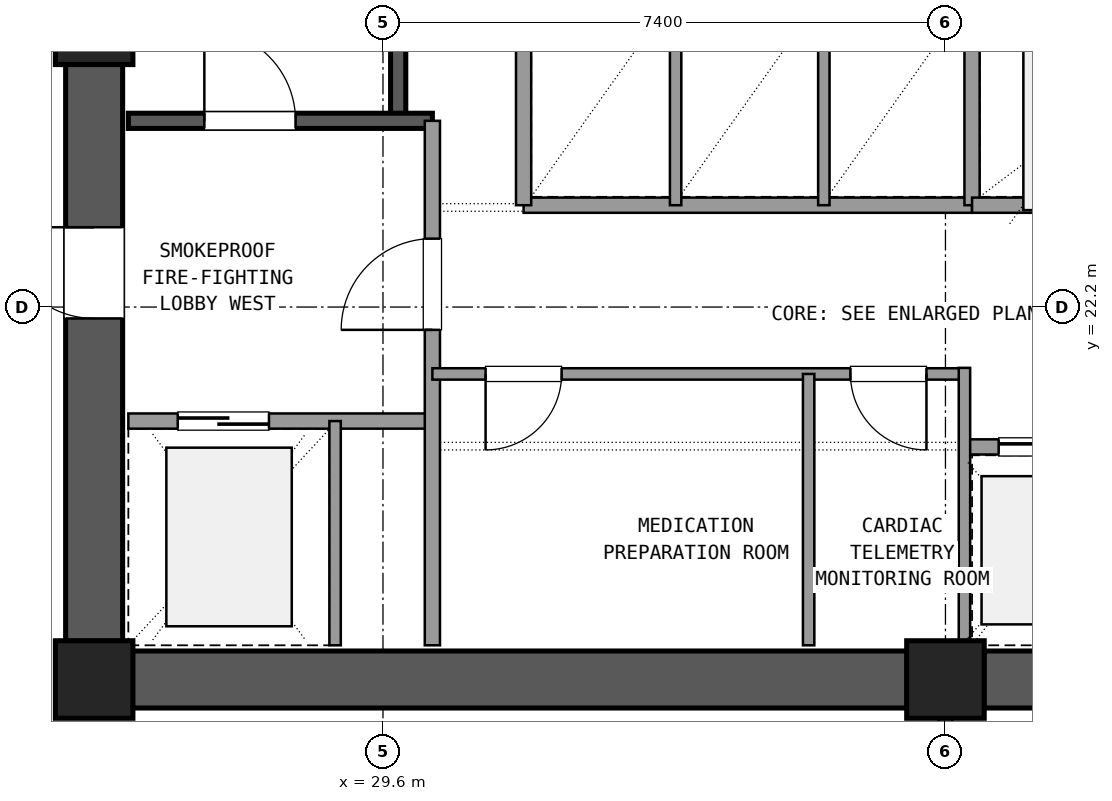
"""IFC4 building model, lengths in metres.
Left out: names, types, materials, properties, quantities, classifications, styles, units other than length and angle.
Written with IfcOpenShell. Run it as: python <this file> out.ifc"""

import sys

from ifc_helpers import new_model, si_unit, direction, frame, frame_2d, origin, origin_2d, place, context, subcontext, project, spatial, rectangle, extrude, element, fill, save


model = new_model("IFC4")
c1 = context("Model", 3, precision=1e-05, world=origin(), true_north=direction((0.0, 1.0)))
c2 = subcontext(c1, "Body", "Model", "MODEL_VIEW")
j1 = project(units=[si_unit("LENGTHUNIT", "METRE"), si_unit("PLANEANGLEUNIT", "RADIAN")], contexts=[c1])
p1 = place(None, origin())
s1 = spatial("IfcSite", under=j1, at=p1, CompositionType="ELEMENT")
p2 = place(p1, origin())
s2 = spatial("IfcBuilding", under=s1, at=p2, CompositionType="ELEMENT")
p3 = place(p2, frame((0.0, 0.0, 160.02)))
s3 = spatial("IfcBuildingStorey", under=s2, at=p3, CompositionType="ELEMENT", Elevation=160.02)
for number, where, z_axis, x_axis in (
    (1, (25.8, 17.3, 0.0), (0.0, 0.0, 1.0), (1.0, 0.0, 0.0)),
    (2, (37.0, 17.3, 0.0), (0.0, 0.0, 1.0), (1.0, 0.0, 0.0)),
    (3, (25.8, 25.9, 0.0), (0.0, 0.0, 1.0), (1.0, 0.0, 0.0)),
):
    element("IfcColumn", number, at=place(p3, frame(where, z_axis=z_axis, x_axis=x_axis)), inside=s3, PredefinedType="COLUMN", context=c2, shape_type="SweptSolid", body=[
        extrude(rectangle(XDim=1.02, YDim=1.02, at=origin_2d()), origin(), (0.0, 0.0, 1.0), 3.6),
    ])
for number, where, z_axis, x_axis in (
    (4, (26.305, 17.3, 0.0), (0.0, 0.0, 1.0), (1.0, 0.0, 0.0)),
    (5, (37.505, 17.3, 0.0), (0.0, 0.0, 1.0), (1.0, 0.0, 0.0)),
):
    element("IfcWall", number, at=place(p3, frame(where, z_axis=z_axis, x_axis=x_axis)), inside=s3, PredefinedType="SHEAR", context=c2, shape_type="SweptSolid", body=[
        extrude(rectangle(XDim=10.19, YDim=0.75, at=frame_2d((5.095, 0.0))), origin(), (0.0, 0.0, 1.0), 3.32),
    ])
p4 = place(p3, frame((25.8, 25.395, 0.0), z_axis=(0.0, 0.0, 1.0), x_axis=(0.0, -1.0, 0.0)))
e6 = element("IfcWall", 6, at=p4, inside=s3, PredefinedType="SHEAR", context=c2, shape_type="SweptSolid", body=[
    extrude(rectangle(XDim=7.59, YDim=0.75, at=frame_2d((3.795, 0.0))), origin(), (0.0, 0.0, 1.0), 3.32),
])
p5 = place(p4, frame((2.145, 0.0, 0.0)))
e7 = element("IfcOpeningElement", 7, at=p5, cuts=e6, PredefinedType="OPENING", context=c2, shape_type="SweptSolid", body=[
    extrude(rectangle(XDim=1.2, YDim=2.15, at=frame_2d((0.6, 1.075))), frame((0.0, 0.385, 0.0), z_axis=(0.0, -1.0, 0.0), x_axis=(1.0, 0.0, 0.0)), (0.0, 0.0, 1.0), 0.77),
])
p6 = place(p3, frame((29.8, 24.65, 0.0), z_axis=(0.0, 0.0, 1.0), x_axis=(0.0, 1.0, 0.0)))
e8 = element("IfcWall", 8, at=p6, inside=s3, PredefinedType="SHEAR", context=c2, shape_type="SweptSolid", body=[
    extrude(rectangle(XDim=9.4, YDim=0.2, at=frame_2d((4.7, 0.0))), origin(), (0.0, 0.0, 1.0), 3.32),
])
p7 = place(p3, frame((26.25, 24.65, 0.0), z_axis=(0.0, 0.0, 1.0), x_axis=(1.0, 0.0, 0.0)))
e9 = element("IfcWall", 9, at=p7, inside=s3, PredefinedType="SHEAR", context=c2, shape_type="SweptSolid", body=[
    extrude(rectangle(XDim=4.0, YDim=0.2, at=frame_2d((2.0, 0.0))), origin(), (0.0, 0.0, 1.0), 3.32),
])
p8 = place(p7, frame((1.0, 0.0, 0.0)))
e10 = element("IfcOpeningElement", 10, at=p8, cuts=e9, PredefinedType="OPENING", context=c2, shape_type="SweptSolid", body=[
    extrude(rectangle(XDim=1.2, YDim=2.15, at=frame_2d((0.6, 1.075))), frame((0.0, 0.11, 0.0), z_axis=(0.0, -1.0, 0.0), x_axis=(1.0, 0.0, 0.0)), (0.0, 0.0, 1.0), 0.22),
])
p9 = place(p3, frame((26.25, 20.7, 0.0), z_axis=(0.0, 0.0, 1.0), x_axis=(1.0, 0.0, 0.0)))
e11 = element("IfcWall", 11, at=p9, inside=s3, PredefinedType="SOLIDWALL", context=c2, shape_type="SweptSolid", body=[
    extrude(rectangle(XDim=4.0, YDim=0.2, at=frame_2d((2.0, 0.0))), origin(), (0.0, 0.0, 1.0), 2.61),
])
p10 = place(p9, frame((0.65, 0.0, 0.0)))
e12 = element("IfcOpeningElement", 12, at=p10, cuts=e11, PredefinedType="OPENING", context=c2, shape_type="SweptSolid", body=[
    extrude(rectangle(XDim=1.2, YDim=2.15, at=frame_2d((0.6, 1.075))), frame((0.0, 0.11, 0.0), z_axis=(0.0, -1.0, 0.0), x_axis=(1.0, 0.0, 0.0)), (0.0, 0.0, 1.0), 0.22),
])
p11 = place(p3, frame((30.25, 17.75, 0.0), z_axis=(0.0, 0.0, 1.0), x_axis=(0.0, 1.0, 0.0)))
e13 = element("IfcWall", 13, at=p11, inside=s3, PredefinedType="SOLIDWALL", context=c2, shape_type="SweptSolid", body=[
    extrude(rectangle(XDim=6.9, YDim=0.2, at=frame_2d((3.45, 0.0))), origin(), (0.0, 0.0, 1.0), 2.61),
])
p12 = place(p11, frame((4.15, 0.0, 0.0)))
e14 = element("IfcOpeningElement", 14, at=p12, cuts=e13, PredefinedType="OPENING", context=c2, shape_type="SweptSolid", body=[
    extrude(rectangle(XDim=1.2, YDim=2.15, at=frame_2d((0.6, 1.075))), frame((0.0, 0.11, 0.0), z_axis=(0.0, -1.0, 0.0), x_axis=(1.0, 0.0, 0.0)), (0.0, 0.0, 1.0), 0.22),
])
p13 = place(p3, frame((28.97, 17.75, 0.0), z_axis=(0.0, 0.0, 1.0), x_axis=(0.0, 1.0, 0.0)))
e15 = element("IfcWall", 15, at=p13, inside=s3, PredefinedType="PARTITIONING", context=c2, shape_type="SweptSolid", body=[
    extrude(rectangle(XDim=2.95, YDim=0.15, at=frame_2d((1.475, 0.0))), origin(), (0.0, 0.0, 1.0), 2.61),
])
p14 = place(p3, frame((30.25, 21.32, 0.0), z_axis=(0.0, 0.0, 1.0), x_axis=(1.0, 0.0, 0.0)))
e16 = element("IfcWall", 16, at=p14, inside=s3, PredefinedType="PARTITIONING", context=c2, shape_type="SweptSolid", body=[
    extrude(rectangle(XDim=7.0, YDim=0.15, at=frame_2d((3.5, 0.0))), origin(), (0.0, 0.0, 1.0), 2.61),
])
p15 = place(p14, frame((0.7, 0.0, 0.0)))
e17 = element("IfcOpeningElement", 17, at=p15, cuts=e16, PredefinedType="OPENING", context=c2, shape_type="SweptSolid", body=[
    extrude(rectangle(XDim=1.0, YDim=2.15, at=frame_2d((0.5, 1.075))), frame((0.0, 0.085, 0.0), z_axis=(0.0, -1.0, 0.0), x_axis=(1.0, 0.0, 0.0)), (0.0, 0.0, 1.0), 0.17),
])
p16 = place(p14, frame((5.5, 0.0, 0.0)))
e18 = element("IfcOpeningElement", 18, at=p16, cuts=e16, PredefinedType="OPENING", context=c2, shape_type="SweptSolid", body=[
    extrude(rectangle(XDim=1.0, YDim=2.15, at=frame_2d((0.5, 1.075))), frame((0.0, 0.085, 0.0), z_axis=(0.0, -1.0, 0.0), x_axis=(1.0, 0.0, 0.0)), (0.0, 0.0, 1.0), 0.17),
])
p17 = place(p3, frame((35.2, 17.75, 0.0), z_axis=(0.0, 0.0, 1.0), x_axis=(0.0, 1.0, 0.0)))
e19 = element("IfcWall", 19, at=p17, inside=s3, PredefinedType="PARTITIONING", context=c2, shape_type="SweptSolid", body=[
    extrude(rectangle(XDim=3.57, YDim=0.15, at=frame_2d((1.785, 0.0))), origin(), (0.0, 0.0, 1.0), 2.61),
])
p18 = place(p3, frame((37.25, 20.36, 0.0), z_axis=(0.0, 0.0, 1.0), x_axis=(1.0, 0.0, 0.0)))
e20 = element("IfcWall", 20, at=p18, inside=s3, PredefinedType="SOLIDWALL", context=c2, shape_type="SweptSolid", body=[
    extrude(rectangle(XDim=6.1, YDim=0.2, at=frame_2d((3.05, 0.0))), origin(), (0.0, 0.0, 1.0), 2.61),
])
p19 = place(p18, frame((0.45, 0.0, 0.0)))
e21 = element("IfcOpeningElement", 21, at=p19, cuts=e20, PredefinedType="OPENING", context=c2, shape_type="SweptSolid", body=[
    extrude(rectangle(XDim=1.1, YDim=2.15, at=frame_2d((0.55, 1.075))), frame((0.0, 0.11, 0.0), z_axis=(0.0, -1.0, 0.0), x_axis=(1.0, 0.0, 0.0)), (0.0, 0.0, 1.0), 0.22),
])
p20 = place(p18, frame((2.5, 0.0, 0.0)))
e22 = element("IfcOpeningElement", 22, at=p20, cuts=e20, PredefinedType="OPENING", context=c2, shape_type="SweptSolid", body=[
    extrude(rectangle(XDim=1.1, YDim=2.15, at=frame_2d((0.55, 1.075))), frame((0.0, 0.11, 0.0), z_axis=(0.0, -1.0, 0.0), x_axis=(1.0, 0.0, 0.0)), (0.0, 0.0, 1.0), 0.22),
])
p21 = place(p18, frame((4.55, 0.0, 0.0)))
e23 = element("IfcOpeningElement", 23, at=p21, cuts=e20, PredefinedType="OPENING", context=c2, shape_type="SweptSolid", body=[
    extrude(rectangle(XDim=1.1, YDim=2.15, at=frame_2d((0.55, 1.075))), frame((0.0, 0.11, 0.0), z_axis=(0.0, -1.0, 0.0), x_axis=(1.0, 0.0, 0.0)), (0.0, 0.0, 1.0), 0.22),
])
p22 = place(p3, frame((37.25, 17.75, 0.0), z_axis=(0.0, 0.0, 1.0), x_axis=(0.0, 1.0, 0.0)))
e24 = element("IfcWall", 24, at=p22, inside=s3, PredefinedType="PARTITIONING", context=c2, shape_type="SweptSolid", body=[
    extrude(rectangle(XDim=3.65, YDim=0.15, at=frame_2d((1.825, 0.0))), origin(), (0.0, 0.0, 1.0), 2.61),
])
p23 = place(p3, frame((31.45, 23.54, 0.0), z_axis=(0.0, 0.0, 1.0), x_axis=(1.0, 0.0, 0.0)))
e25 = element("IfcWall", 25, at=p23, inside=s3, PredefinedType="SOLIDWALL", context=c2, shape_type="SweptSolid", body=[
    extrude(rectangle(XDim=5.9, YDim=0.2, at=frame_2d((2.95, 0.0))), origin(), (0.0, 0.0, 1.0), 2.61),
])
p24 = place(p3, frame((31.45, 23.54, 0.0), z_axis=(0.0, 0.0, 1.0), x_axis=(0.0, 1.0, 0.0)))
e26 = element("IfcWall", 26, at=p24, inside=s3, PredefinedType="SOLIDWALL", context=c2, shape_type="SweptSolid", body=[
    extrude(rectangle(XDim=2.81, YDim=0.2, at=frame_2d((1.405, 0.0))), origin(), (0.0, 0.0, 1.0), 2.61),
])
for number, where, z_axis, x_axis in (
    (27, (33.45, 23.54, 0.0), (0.0, 0.0, 1.0), (0.0, 1.0, 0.0)),
    (28, (35.4, 23.54, 0.0), (0.0, 0.0, 1.0), (0.0, 1.0, 0.0)),
):
    element("IfcWall", number, at=place(p3, frame(where, z_axis=z_axis, x_axis=x_axis)), inside=s3, PredefinedType="PARTITIONING", context=c2, shape_type="SweptSolid", body=[
        extrude(rectangle(XDim=2.81, YDim=0.15, at=frame_2d((1.405, 0.0))), origin(), (0.0, 0.0, 1.0), 2.61),
    ])
p25 = place(p3, frame((37.35, 23.54, 0.0), z_axis=(0.0, 0.0, 1.0), x_axis=(0.0, 1.0, 0.0)))
e29 = element("IfcWall", 29, at=p25, inside=s3, PredefinedType="SOLIDWALL", context=c2, shape_type="SweptSolid", body=[
    extrude(rectangle(XDim=6.82, YDim=0.2, at=frame_2d((3.41, 0.0))), origin(), (0.0, 0.0, 1.0), 2.61),
])
p26 = place(p3, frame((37.35, 23.54, 0.0), z_axis=(0.0, 0.0, 1.0), x_axis=(1.0, 0.0, 0.0)))
e30 = element("IfcWall", 30, at=p26, inside=s3, PredefinedType="SOLIDWALL", context=c2, shape_type="SweptSolid", body=[
    extrude(rectangle(XDim=3.05, YDim=0.2, at=frame_2d((1.525, 0.0))), origin(), (0.0, 0.0, 1.0), 2.61),
])
p27 = place(p3, frame((37.0, 13.64, 0.0), z_axis=(0.0, 0.0, 1.0), x_axis=(0.0, 1.0, 0.0)))
e31 = element("IfcWall", 31, at=p27, inside=s3, PredefinedType="PARTITIONING", context=c2, shape_type="SweptSolid", body=[
    extrude(rectangle(XDim=3.21, YDim=0.18, at=frame_2d((1.605, 0.0))), origin(), (0.0, 0.0, 1.0), 2.61),
])
p28 = place(p27, frame((0.605, 0.0, 0.0)))
e32 = element("IfcOpeningElement", 32, at=p28, cuts=e31, PredefinedType="OPENING", context=c2, shape_type="SweptSolid", body=[
    extrude(rectangle(XDim=2.0, YDim=2.2, at=frame_2d((1.0, 1.1))), frame((0.0, 0.1, 0.0), z_axis=(0.0, -1.0, 0.0), x_axis=(1.0, 0.0, 0.0)), (0.0, 0.0, 1.0), 0.2),
])
p29 = place(p8, origin())
e33 = element("IfcDoor", 33, at=p29, inside=s3, OperationType="SINGLE_SWING_LEFT", PredefinedType="DOOR", context=c2, shape_type="SweptSolid", body=[
    extrude(rectangle(XDim=1.2, YDim=2.15, at=frame_2d((0.6, 1.075))), frame((0.0, 0.025, 0.0), z_axis=(0.0, -1.0, 0.0), x_axis=(1.0, 0.0, 0.0)), (0.0, 0.0, 1.0), 0.05),
])
fill(e10, e33)
p30 = place(p10, origin())
e34 = element("IfcDoor", 34, at=p30, inside=s3, OperationType="SLIDING_TO_LEFT", PredefinedType="DOOR", context=c2, shape_type="SweptSolid", body=[
    extrude(rectangle(XDim=1.2, YDim=2.15, at=frame_2d((0.6, 1.075))), frame((0.0, 0.025, 0.0), z_axis=(0.0, -1.0, 0.0), x_axis=(1.0, 0.0, 0.0)), (0.0, 0.0, 1.0), 0.05),
])
fill(e12, e34)
p31 = place(p12, origin())
e35 = element("IfcDoor", 35, at=p31, inside=s3, OperationType="SINGLE_SWING_LEFT", PredefinedType="DOOR", context=c2, shape_type="SweptSolid", body=[
    extrude(rectangle(XDim=1.2, YDim=2.15, at=frame_2d((0.6, 1.075))), frame((0.0, 0.025, 0.0), z_axis=(0.0, -1.0, 0.0), x_axis=(1.0, 0.0, 0.0)), (0.0, 0.0, 1.0), 0.05),
])
fill(e14, e35)
p32 = place(p5, frame((1.2, 0.0, 0.0), z_axis=(0.0, 0.0, 1.0), x_axis=(-1.0, 0.0, 0.0)))
e36 = element("IfcDoor", 36, at=p32, inside=s3, OperationType="SINGLE_SWING_LEFT", PredefinedType="DOOR", context=c2, shape_type="SweptSolid", body=[
    extrude(rectangle(XDim=1.2, YDim=2.15, at=frame_2d((0.6, 1.075))), frame((0.0, 0.025, 0.0), z_axis=(0.0, -1.0, 0.0), x_axis=(1.0, 0.0, 0.0)), (0.0, 0.0, 1.0), 0.05),
])
fill(e7, e36)
p33 = place(p15, frame((1.0, 0.0, 0.0), z_axis=(0.0, 0.0, 1.0), x_axis=(-1.0, 0.0, 0.0)))
e37 = element("IfcDoor", 37, at=p33, inside=s3, OperationType="SINGLE_SWING_LEFT", PredefinedType="DOOR", context=c2, shape_type="SweptSolid", body=[
    extrude(rectangle(XDim=1.0, YDim=2.15, at=frame_2d((0.5, 1.075))), frame((0.0, 0.025, 0.0), z_axis=(0.0, -1.0, 0.0), x_axis=(1.0, 0.0, 0.0)), (0.0, 0.0, 1.0), 0.05),
])
fill(e17, e37)
p34 = place(p16, frame((1.0, 0.0, 0.0), z_axis=(0.0, 0.0, 1.0), x_axis=(-1.0, 0.0, 0.0)))
e38 = element("IfcDoor", 38, at=p34, inside=s3, OperationType="SINGLE_SWING_RIGHT", PredefinedType="DOOR", context=c2, shape_type="SweptSolid", body=[
    extrude(rectangle(XDim=1.0, YDim=2.15, at=frame_2d((0.5, 1.075))), frame((0.0, 0.025, 0.0), z_axis=(0.0, -1.0, 0.0), x_axis=(1.0, 0.0, 0.0)), (0.0, 0.0, 1.0), 0.05),
])
fill(e18, e38)
p35 = place(p19, origin())
e39 = element("IfcDoor", 39, at=p35, inside=s3, OperationType="SLIDING_TO_LEFT", PredefinedType="DOOR", context=c2, shape_type="SweptSolid", body=[
    extrude(rectangle(XDim=1.1, YDim=2.15, at=frame_2d((0.55, 1.075))), frame((0.0, 0.025, 0.0), z_axis=(0.0, -1.0, 0.0), x_axis=(1.0, 0.0, 0.0)), (0.0, 0.0, 1.0), 0.05),
])
fill(e21, e39)
save(model, sys.argv[1])
